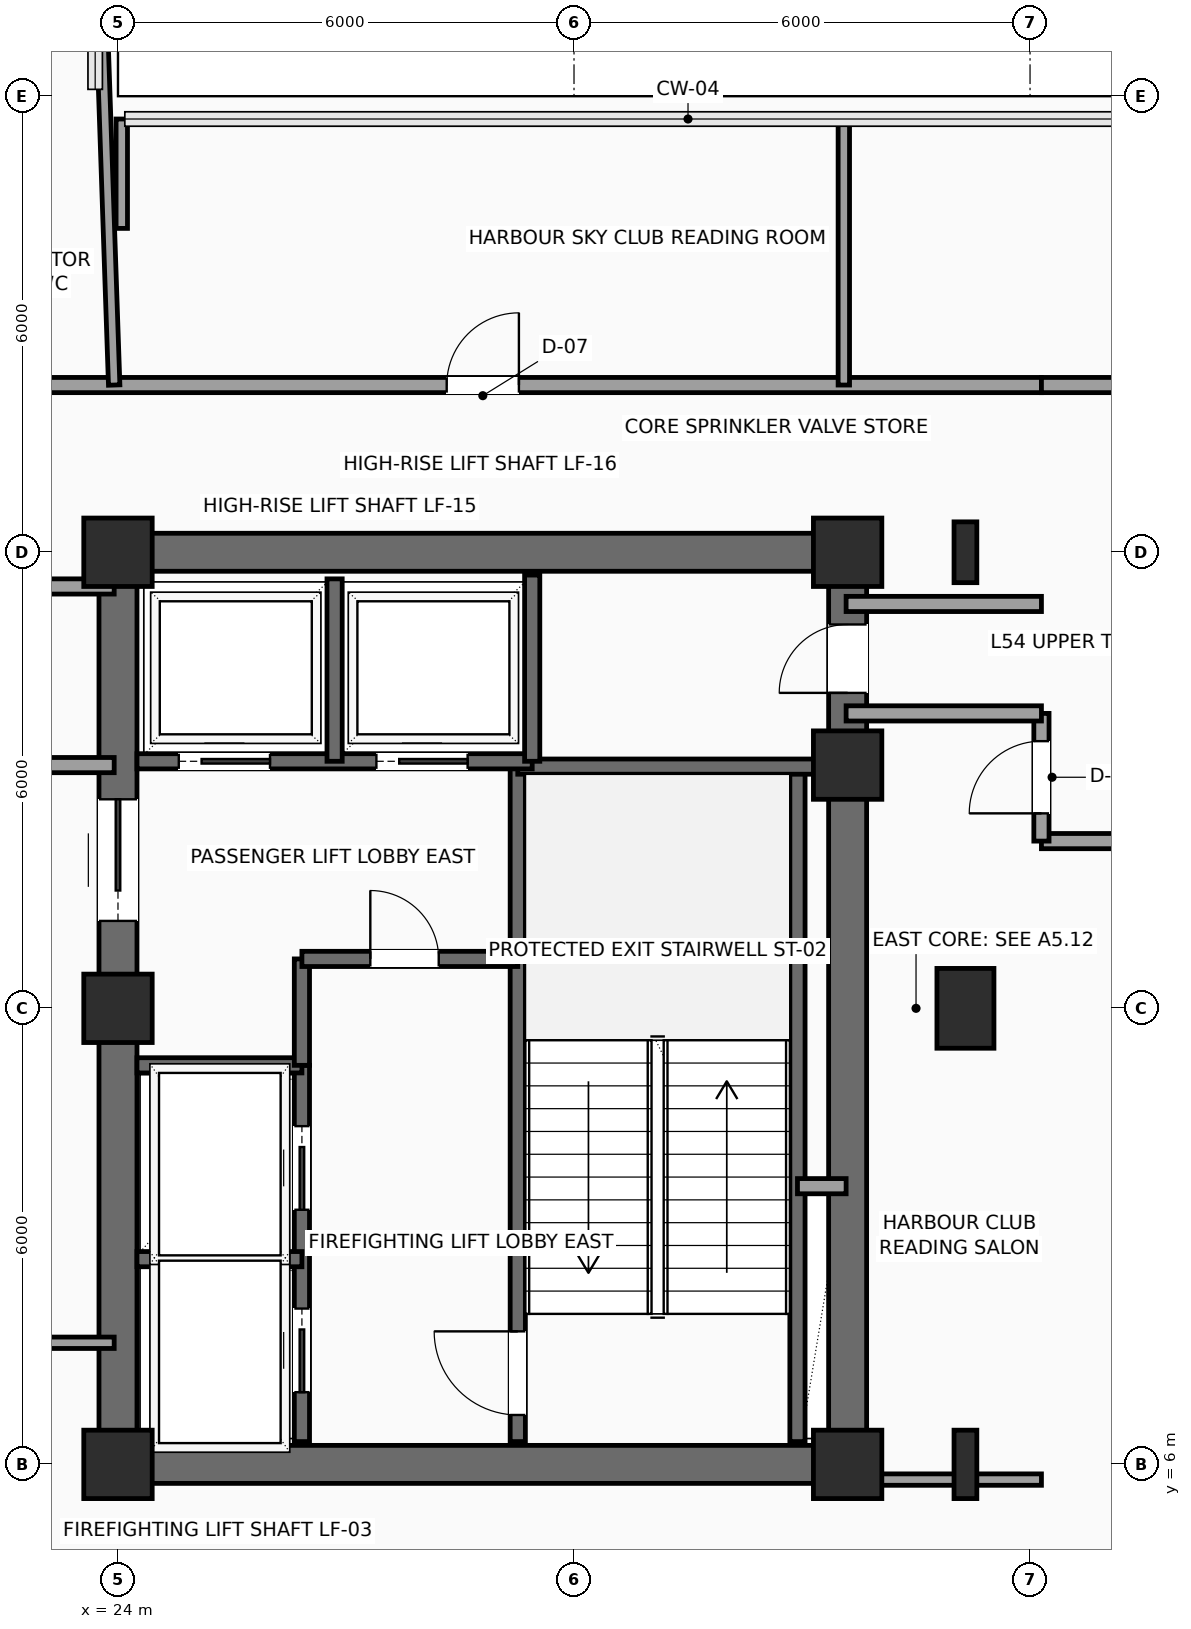
"""IFC4 building model, lengths in metres.
Left out: names, types, materials, properties, quantities, classifications, styles, units other than length and angle.
Written with IfcOpenShell. Run it as: python <this file> out.ifc"""

import sys

from ifc_helpers import new_model, si_unit, direction, frame, frame_2d, origin, origin_2d, place, context, subcontext, project, spatial, rectangle, i_section, extrude, element, fill, save


model = new_model("IFC4")
c1 = context("Model", 3, precision=1e-05, world=origin(), true_north=direction((0.0, 1.0)))
c2 = subcontext(c1, "Body", "Model", "MODEL_VIEW")
j1 = project(units=[si_unit("LENGTHUNIT", "METRE"), si_unit("PLANEANGLEUNIT", "RADIAN")], contexts=[c1])
p1 = place(None, origin())
s1 = spatial("IfcSite", under=j1, at=p1, CompositionType="ELEMENT")
p2 = place(p1, origin())
s2 = spatial("IfcBuilding", under=s1, at=p2, CompositionType="ELEMENT")
p3 = place(p2, frame((0.0, 0.0, 219.9)))
s3 = spatial("IfcBuildingStorey", under=s2, at=p3, CompositionType="ELEMENT", Elevation=219.9)
for number, where, z_axis, x_axis in (
    (1, (24.0, 6.0, 0.0), (0.0, 0.0, 1.0), (1.0, 0.0, 0.0)),
    (2, (24.0, 12.0, 0.0), (0.0, 0.0, 1.0), (1.0, 0.0, 0.0)),
    (3, (24.0, 18.0, 0.0), (0.0, 0.0, 1.0), (1.0, 0.0, 0.0)),
    (4, (33.6, 6.0, 0.0), (0.0, 0.0, 1.0), (1.0, 0.0, 0.0)),
    (5, (33.6, 15.2, 0.0), (0.0, 0.0, 1.0), (1.0, 0.0, 0.0)),
    (6, (33.6, 18.0, 0.0), (0.0, 0.0, 1.0), (1.0, 0.0, 0.0)),
):
    element("IfcColumn", number, at=place(p3, frame(where, z_axis=z_axis, x_axis=x_axis)), inside=s3, PredefinedType="COLUMN", context=c2, shape_type="SweptSolid", body=[
        extrude(rectangle(XDim=0.9, YDim=0.9, at=origin_2d()), origin(), (0.0, 0.0, 1.0), 3.75),
    ])
p4 = place(p3, frame((35.15, 6.0, 0.0), z_axis=(0.0, 0.0, 1.0), x_axis=(1.0, 0.0, 0.0)))
e7 = element("IfcColumn", 7, at=p4, inside=s3, PredefinedType="COLUMN", context=c2, shape_type="SweptSolid", body=[
    extrude(i_section(OverallWidth=0.3, OverallDepth=0.9, WebThickness=0.019, FlangeThickness=0.035, FilletRadius=0.03, at=origin_2d()), origin(), (0.0, 0.0, 1.0), 3.75),
])
p5 = place(p3, frame((35.15, 12.0, 0.0), z_axis=(0.0, 0.0, 1.0), x_axis=(1.0, 0.0, 0.0)))
e8 = element("IfcColumn", 8, at=p5, inside=s3, PredefinedType="COLUMN", context=c2, shape_type="SweptSolid", body=[
    extrude(rectangle(XDim=0.75, YDim=1.05, at=origin_2d()), origin(), (0.0, 0.0, 1.0), 3.75),
])
p6 = place(p3, frame((35.15, 18.0, 0.0), z_axis=(0.0, 0.0, 1.0), x_axis=(1.0, 0.0, 0.0)))
e9 = element("IfcColumn", 9, at=p6, inside=s3, PredefinedType="COLUMN", context=c2, shape_type="SweptSolid", body=[
    extrude(i_section(OverallWidth=0.3, OverallDepth=0.8, WebThickness=0.018, FlangeThickness=0.033, FilletRadius=0.03, at=origin_2d()), origin(), (0.0, 0.0, 1.0), 3.75),
])
for number, where, z_axis, x_axis in (
    (10, (24.0, 6.0, 0.0), (0.0, 0.0, 1.0), (1.0, 0.0, 0.0)),
    (11, (24.0, 18.0, 0.0), (0.0, 0.0, 1.0), (1.0, 0.0, 0.0)),
):
    element("IfcWall", number, at=place(p3, frame(where, z_axis=z_axis, x_axis=x_axis)), inside=s3, PredefinedType="SHEAR", context=c2, shape_type="SweptSolid", body=[
        extrude(rectangle(XDim=9.6, YDim=0.5, at=frame_2d((4.8, 0.0))), origin(), (0.0, 0.0, 1.0), 3.54),
    ])
p7 = place(p3, frame((24.0, 6.0, 0.0), z_axis=(0.0, 0.0, 1.0), x_axis=(0.0, 1.0, 0.0)))
e12 = element("IfcWall", 12, at=p7, inside=s3, PredefinedType="SHEAR", context=c2, shape_type="SweptSolid", body=[
    extrude(rectangle(XDim=12.0, YDim=0.5, at=frame_2d((6.0, 0.0))), origin(), (0.0, 0.0, 1.0), 3.54),
])
p8 = place(p7, frame((7.15, 0.0, 0.0)))
e13 = element("IfcOpeningElement", 13, at=p8, cuts=e12, PredefinedType="OPENING", context=c2, shape_type="SweptSolid", body=[
    extrude(rectangle(XDim=1.6, YDim=2.3, at=frame_2d((0.8, 1.15))), frame((0.0, 0.26, 0.0), z_axis=(0.0, -1.0, 0.0), x_axis=(1.0, 0.0, 0.0)), (0.0, 0.0, 1.0), 0.52),
])
p9 = place(p3, frame((33.6, 6.0, 0.0), z_axis=(0.0, 0.0, 1.0), x_axis=(0.0, 1.0, 0.0)))
e14 = element("IfcWall", 14, at=p9, inside=s3, PredefinedType="SHEAR", context=c2, shape_type="SweptSolid", body=[
    extrude(rectangle(XDim=12.0, YDim=0.5, at=frame_2d((6.0, 0.0))), origin(), (0.0, 0.0, 1.0), 3.54),
])
p10 = place(p9, frame((10.15, 0.0, 0.0)))
e15 = element("IfcOpeningElement", 15, at=p10, cuts=e14, PredefinedType="OPENING", context=c2, shape_type="SweptSolid", body=[
    extrude(rectangle(XDim=0.9, YDim=2.15, at=frame_2d((0.45, 1.075))), frame((0.0, 0.26, 0.0), z_axis=(0.0, -1.0, 0.0), x_axis=(1.0, 0.0, 0.0)), (0.0, 0.0, 1.0), 0.52),
])
p11 = place(p3, frame((29.26, 6.3, 0.0), z_axis=(0.0, 0.0, 1.0), x_axis=(0.0, 1.0, 0.0)))
e16 = element("IfcWall", 16, at=p11, inside=s3, PredefinedType="SHEAR", context=c2, shape_type="SweptSolid", body=[
    extrude(rectangle(XDim=8.88, YDim=0.2, at=frame_2d((4.44, 0.0))), origin(), (0.0, 0.0, 1.0), 3.54),
])
p12 = place(p11, frame((0.35, 0.0, 0.0)))
e17 = element("IfcOpeningElement", 17, at=p12, cuts=e16, PredefinedType="OPENING", context=c2, shape_type="SweptSolid", body=[
    extrude(rectangle(XDim=1.1, YDim=2.2, at=frame_2d((0.55, 1.1))), frame((0.0, 0.11, 0.0), z_axis=(0.0, -1.0, 0.0), x_axis=(1.0, 0.0, 0.0)), (0.0, 0.0, 1.0), 0.22),
])
p13 = place(p3, frame((32.94, 6.3, 0.0), z_axis=(0.0, 0.0, 1.0), x_axis=(0.0, 1.0, 0.0)))
e18 = element("IfcWall", 18, at=p13, inside=s3, PredefinedType="SHEAR", context=c2, shape_type="SweptSolid", body=[
    extrude(rectangle(XDim=8.88, YDim=0.2, at=frame_2d((4.44, 0.0))), origin(), (0.0, 0.0, 1.0), 3.54),
])
p14 = place(p3, frame((29.26, 15.18, 0.0), z_axis=(0.0, 0.0, 1.0), x_axis=(1.0, 0.0, 0.0)))
e19 = element("IfcWall", 19, at=p14, inside=s3, PredefinedType="SHEAR", context=c2, shape_type="SweptSolid", body=[
    extrude(rectangle(XDim=4.04, YDim=0.2, at=frame_2d((2.02, 0.0))), origin(), (0.0, 0.0, 1.0), 3.54),
])
p15 = place(p3, frame((26.42, 6.3, 0.0), z_axis=(0.0, 0.0, 1.0), x_axis=(0.0, 1.0, 0.0)))
e20 = element("IfcWall", 20, at=p15, inside=s3, PredefinedType="SHEAR", context=c2, shape_type="SweptSolid", body=[
    extrude(rectangle(XDim=4.95, YDim=0.2, at=frame_2d((2.475, 0.0))), origin(), (0.0, 0.0, 1.0), 3.54),
])
p16 = place(p15, frame((0.65, 0.0, 0.0)))
e21 = element("IfcOpeningElement", 21, at=p16, cuts=e20, PredefinedType="OPENING", context=c2, shape_type="SweptSolid", body=[
    extrude(rectangle(XDim=1.1, YDim=2.2, at=frame_2d((0.55, 1.1))), frame((0.0, 0.11, 0.0), z_axis=(0.0, -1.0, 0.0), x_axis=(1.0, 0.0, 0.0)), (0.0, 0.0, 1.0), 0.22),
])
p17 = place(p15, frame((3.05, 0.0, 0.0)))
e22 = element("IfcOpeningElement", 22, at=p17, cuts=e20, PredefinedType="OPENING", context=c2, shape_type="SweptSolid", body=[
    extrude(rectangle(XDim=1.1, YDim=2.2, at=frame_2d((0.55, 1.1))), frame((0.0, 0.11, 0.0), z_axis=(0.0, -1.0, 0.0), x_axis=(1.0, 0.0, 0.0)), (0.0, 0.0, 1.0), 0.22),
])
for number, where, z_axis, x_axis in (
    (23, (24.25, 8.7, 0.0), (0.0, 0.0, 1.0), (1.0, 0.0, 0.0)),
    (24, (24.25, 11.25, 0.0), (0.0, 0.0, 1.0), (1.0, 0.0, 0.0)),
):
    element("IfcWall", number, at=place(p3, frame(where, z_axis=z_axis, x_axis=x_axis)), inside=s3, PredefinedType="SHEAR", context=c2, shape_type="SweptSolid", body=[
        extrude(rectangle(XDim=2.17, YDim=0.2, at=frame_2d((1.085, 0.0))), origin(), (0.0, 0.0, 1.0), 3.54),
    ])
p18 = place(p3, frame((26.42, 11.25, 0.0), z_axis=(0.0, 0.0, 1.0), x_axis=(0.0, 1.0, 0.0)))
e25 = element("IfcWall", 25, at=p18, inside=s3, PredefinedType="SHEAR", context=c2, shape_type="SweptSolid", body=[
    extrude(rectangle(XDim=1.4, YDim=0.2, at=frame_2d((0.7, 0.0))), origin(), (0.0, 0.0, 1.0), 3.54),
])
p19 = place(p3, frame((26.42, 12.65, 0.0), z_axis=(0.0, 0.0, 1.0), x_axis=(1.0, 0.0, 0.0)))
e26 = element("IfcWall", 26, at=p19, inside=s3, PredefinedType="SHEAR", context=c2, shape_type="SweptSolid", body=[
    extrude(rectangle(XDim=2.84, YDim=0.2, at=frame_2d((1.42, 0.0))), origin(), (0.0, 0.0, 1.0), 3.54),
])
p20 = place(p19, frame((0.9, 0.0, 0.0)))
e27 = element("IfcOpeningElement", 27, at=p20, cuts=e26, PredefinedType="OPENING", context=c2, shape_type="SweptSolid", body=[
    extrude(rectangle(XDim=0.9, YDim=2.15, at=frame_2d((0.45, 1.075))), frame((0.0, 0.11, 0.0), z_axis=(0.0, -1.0, 0.0), x_axis=(1.0, 0.0, 0.0)), (0.0, 0.0, 1.0), 0.22),
])
p21 = place(p3, frame((32.94, 9.66, 0.0), z_axis=(0.0, 0.0, 1.0), x_axis=(1.0, 0.0, 0.0)))
e28 = element("IfcWall", 28, at=p21, inside=s3, PredefinedType="SOLIDWALL", context=c2, shape_type="SweptSolid", body=[
    extrude(rectangle(XDim=0.64, YDim=0.2, at=frame_2d((0.32, 0.0))), origin(), (0.0, 0.0, 1.0), 3.54),
])
p22 = place(p3, frame((24.25, 15.25, 0.0), z_axis=(0.0, 0.0, 1.0), x_axis=(1.0, 0.0, 0.0)))
e29 = element("IfcWall", 29, at=p22, inside=s3, PredefinedType="SHEAR", context=c2, shape_type="SweptSolid", body=[
    extrude(rectangle(XDim=5.2, YDim=0.2, at=frame_2d((2.6, 0.0))), origin(), (0.0, 0.0, 1.0), 3.54),
])
p23 = place(p22, frame((0.55, 0.0, 0.0)))
e30 = element("IfcOpeningElement", 30, at=p23, cuts=e29, PredefinedType="OPENING", context=c2, shape_type="SweptSolid", body=[
    extrude(rectangle(XDim=1.2, YDim=2.2, at=frame_2d((0.6, 1.1))), frame((0.0, 0.11, 0.0), z_axis=(0.0, -1.0, 0.0), x_axis=(1.0, 0.0, 0.0)), (0.0, 0.0, 1.0), 0.22),
])
p24 = place(p22, frame((3.15, 0.0, 0.0)))
e31 = element("IfcOpeningElement", 31, at=p24, cuts=e29, PredefinedType="OPENING", context=c2, shape_type="SweptSolid", body=[
    extrude(rectangle(XDim=1.2, YDim=2.2, at=frame_2d((0.6, 1.1))), frame((0.0, 0.11, 0.0), z_axis=(0.0, -1.0, 0.0), x_axis=(1.0, 0.0, 0.0)), (0.0, 0.0, 1.0), 0.22),
])
p25 = place(p3, frame((26.85, 15.25, 0.0), z_axis=(0.0, 0.0, 1.0), x_axis=(0.0, 1.0, 0.0)))
e32 = element("IfcWall", 32, at=p25, inside=s3, PredefinedType="SHEAR", context=c2, shape_type="SweptSolid", body=[
    extrude(rectangle(XDim=2.4, YDim=0.2, at=frame_2d((1.2, 0.0))), origin(), (0.0, 0.0, 1.0), 3.54),
])
p26 = place(p3, frame((29.45, 15.25, 0.0), z_axis=(0.0, 0.0, 1.0), x_axis=(0.0, 1.0, 0.0)))
e33 = element("IfcWall", 33, at=p26, inside=s3, PredefinedType="SHEAR", context=c2, shape_type="SweptSolid", body=[
    extrude(rectangle(XDim=2.45, YDim=0.2, at=frame_2d((1.225, 0.0))), origin(), (0.0, 0.0, 1.0), 3.54),
])
p27 = place(p3, frame((20.45, 20.2, 0.0), z_axis=(0.0, 0.0, 1.0), x_axis=(1.0, 0.0, 0.0)))
e34 = element("IfcWall", 34, at=p27, inside=s3, PredefinedType="SOLIDWALL", context=c2, shape_type="SweptSolid", body=[
    extrude(rectangle(XDim=15.7, YDim=0.2, at=frame_2d((7.85, 0.0))), origin(), (0.0, 0.0, 1.0), 3.54),
])
p28 = place(p27, frame((7.875, 0.0, 0.0)))
e35 = element("IfcOpeningElement", 35, at=p28, cuts=e34, PredefinedType="OPENING", context=c2, shape_type="SweptSolid", body=[
    extrude(rectangle(XDim=0.95, YDim=2.15, at=frame_2d((0.475, 1.075))), frame((0.0, 0.11, 0.0), z_axis=(0.0, -1.0, 0.0), x_axis=(1.0, 0.0, 0.0)), (0.0, 0.0, 1.0), 0.22),
])
for number, where, z_axis, x_axis in (
    (36, (36.15, 20.2, 0.0), (0.0, 0.0, 1.0), (1.0, 0.0, 0.0)),
    (37, (38.55, 14.2, 0.0), (0.0, 0.0, 1.0), (-1.0, 0.0, 0.0)),
):
    element("IfcWall", number, at=place(p3, frame(where, z_axis=z_axis, x_axis=x_axis)), inside=s3, PredefinedType="SOLIDWALL", context=c2, shape_type="SweptSolid", body=[
        extrude(rectangle(XDim=2.4, YDim=0.2, at=frame_2d((1.2, 0.0))), origin(), (0.0, 0.0, 1.0), 3.54),
    ])
p29 = place(p3, frame((36.15, 14.2, 0.0), z_axis=(0.0, 0.0, 1.0), x_axis=(0.0, 1.0, 0.0)))
e38 = element("IfcWall", 38, at=p29, inside=s3, PredefinedType="SOLIDWALL", context=c2, shape_type="SweptSolid", body=[
    extrude(rectangle(XDim=1.68, YDim=0.2, at=frame_2d((0.84, 0.0))), origin(), (0.0, 0.0, 1.0), 3.54),
])
p30 = place(p29, frame((0.365, 0.0, 0.0)))
e39 = element("IfcOpeningElement", 39, at=p30, cuts=e38, PredefinedType="OPENING", context=c2, shape_type="SweptSolid", body=[
    extrude(rectangle(XDim=0.95, YDim=2.15, at=frame_2d((0.475, 1.075))), frame((0.0, 0.11, 0.0), z_axis=(0.0, -1.0, 0.0), x_axis=(1.0, 0.0, 0.0)), (0.0, 0.0, 1.0), 0.22),
])
for number, where, z_axis, x_axis in (
    (40, (36.15, 15.88, 0.0), (0.0, 0.0, 1.0), (-1.0, 0.0, 0.0)),
    (41, (33.58, 17.32, 0.0), (0.0, 0.0, 1.0), (1.0, 0.0, 0.0)),
):
    element("IfcWall", number, at=place(p3, frame(where, z_axis=z_axis, x_axis=x_axis)), inside=s3, PredefinedType="SOLIDWALL", context=c2, shape_type="SweptSolid", body=[
        extrude(rectangle(XDim=2.57, YDim=0.2, at=frame_2d((1.285, 0.0))), origin(), (0.0, 0.0, 1.0), 3.54),
    ])
p31 = place(p3, frame((20.45, 17.55, 0.0), z_axis=(0.0, 0.0, 1.0), x_axis=(1.0, 0.0, 0.0)))
e42 = element("IfcWall", 42, at=p31, inside=s3, PredefinedType="SOLIDWALL", context=c2, shape_type="SweptSolid", body=[
    extrude(rectangle(XDim=3.5, YDim=0.2, at=frame_2d((1.75, 0.0))), origin(), (0.0, 0.0, 1.0), 3.54),
])
p32 = place(p3, frame((23.95, 15.2, 0.0), z_axis=(0.0, 0.0, 1.0), x_axis=(-1.0, 0.0, 0.0)))
e43 = element("IfcWall", 43, at=p32, inside=s3, PredefinedType="SOLIDWALL", context=c2, shape_type="SweptSolid", body=[
    extrude(rectangle(XDim=9.0, YDim=0.2, at=frame_2d((4.5, 0.0))), origin(), (0.0, 0.0, 1.0), 3.132),
])
p33 = place(p3, frame((23.95, 20.2, 0.0), z_axis=(0.0, 0.0, 1.0), x_axis=(-0.033993495762, 0.999422054112, 0.0)))
e44 = element("IfcWall", 44, at=p33, inside=s3, PredefinedType="PARTITIONING", context=c2, shape_type="SweptSolid", body=[
    extrude(rectangle(XDim=7.354, YDim=0.15, at=frame_2d((3.677, 0.0))), origin(), (0.0, 0.0, 1.0), 3.54),
])
p34 = place(p3, frame((24.05, 22.261, 0.0), z_axis=(0.0, 0.0, 1.0), x_axis=(0.0, 1.0, 0.0)))
e45 = element("IfcWall", 45, at=p34, inside=s3, PredefinedType="PARTITIONING", context=c2, shape_type="SweptSolid", body=[
    extrude(rectangle(XDim=1.439, YDim=0.15, at=frame_2d((0.719, 0.0))), origin(), (0.0, 0.0, 1.0), 3.54),
])
p35 = place(p3, frame((33.55, 20.2, 0.0), z_axis=(0.0, 0.0, 1.0), x_axis=(0.0, 1.0, 0.0)))
e46 = element("IfcWall", 46, at=p35, inside=s3, PredefinedType="PARTITIONING", context=c2, shape_type="SweptSolid", body=[
    extrude(rectangle(XDim=3.5, YDim=0.15, at=frame_2d((1.75, 0.0))), origin(), (0.0, 0.0, 1.0), 3.54),
])
p36 = place(p3, frame((33.65, 5.8, 0.0), z_axis=(0.0, 0.0, 1.0), x_axis=(1.0, 0.0, 0.0)))
e47 = element("IfcWall", 47, at=p36, inside=s3, PredefinedType="PARTITIONING", context=c2, shape_type="SweptSolid", body=[
    extrude(rectangle(XDim=2.5, YDim=0.15, at=frame_2d((1.25, 0.0))), origin(), (0.0, 0.0, 1.0), 3.132),
])
p37 = place(p3, frame((14.95, 7.6, 0.0), z_axis=(0.0, 0.0, 1.0), x_axis=(1.0, 0.0, 0.0)))
e48 = element("IfcWall", 48, at=p37, inside=s3, PredefinedType="PARTITIONING", context=c2, shape_type="SweptSolid", body=[
    extrude(rectangle(XDim=9.0, YDim=0.15, at=frame_2d((4.5, 0.0))), origin(), (0.0, 0.0, 1.0), 3.54),
])
p38 = place(p8, origin())
e49 = element("IfcDoor", 49, at=p38, inside=s3, OperationType="DOUBLE_DOOR_SLIDING", PredefinedType="DOOR", context=c2, shape_type="SweptSolid", body=[
    extrude(rectangle(XDim=1.6, YDim=2.3, at=frame_2d((0.8, 1.15))), frame((0.0, 0.025, 0.0), z_axis=(0.0, -1.0, 0.0), x_axis=(1.0, 0.0, 0.0)), (0.0, 0.0, 1.0), 0.05),
])
fill(e13, e49)
p39 = place(p10, origin())
e50 = element("IfcDoor", 50, at=p39, inside=s3, OperationType="SINGLE_SWING_LEFT", PredefinedType="DOOR", context=c2, shape_type="SweptSolid", body=[
    extrude(rectangle(XDim=0.9, YDim=2.15, at=frame_2d((0.45, 1.075))), frame((0.0, 0.025, 0.0), z_axis=(0.0, -1.0, 0.0), x_axis=(1.0, 0.0, 0.0)), (0.0, 0.0, 1.0), 0.05),
])
fill(e15, e50)
p40 = place(p12, origin())
e51 = element("IfcDoor", 51, at=p40, inside=s3, OperationType="SINGLE_SWING_RIGHT", PredefinedType="DOOR", context=c2, shape_type="SweptSolid", body=[
    extrude(rectangle(XDim=1.1, YDim=2.2, at=frame_2d((0.55, 1.1))), frame((0.0, 0.025, 0.0), z_axis=(0.0, -1.0, 0.0), x_axis=(1.0, 0.0, 0.0)), (0.0, 0.0, 1.0), 0.05),
])
fill(e17, e51)
p41 = place(p16, origin())
e52 = element("IfcDoor", 52, at=p41, inside=s3, OperationType="SLIDING_TO_LEFT", PredefinedType="DOOR", context=c2, shape_type="SweptSolid", body=[
    extrude(rectangle(XDim=1.1, YDim=2.2, at=frame_2d((0.55, 1.1))), frame((0.0, 0.025, 0.0), z_axis=(0.0, -1.0, 0.0), x_axis=(1.0, 0.0, 0.0)), (0.0, 0.0, 1.0), 0.05),
])
fill(e21, e52)
p42 = place(p17, origin())
e53 = element("IfcDoor", 53, at=p42, inside=s3, OperationType="SLIDING_TO_LEFT", PredefinedType="DOOR", context=c2, shape_type="SweptSolid", body=[
    extrude(rectangle(XDim=1.1, YDim=2.2, at=frame_2d((0.55, 1.1))), frame((0.0, 0.025, 0.0), z_axis=(0.0, -1.0, 0.0), x_axis=(1.0, 0.0, 0.0)), (0.0, 0.0, 1.0), 0.05),
])
fill(e22, e53)
p43 = place(p20, origin())
e54 = element("IfcDoor", 54, at=p43, inside=s3, OperationType="SINGLE_SWING_LEFT", PredefinedType="DOOR", context=c2, shape_type="SweptSolid", body=[
    extrude(rectangle(XDim=0.9, YDim=2.15, at=frame_2d((0.45, 1.075))), frame((0.0, 0.025, 0.0), z_axis=(0.0, -1.0, 0.0), x_axis=(1.0, 0.0, 0.0)), (0.0, 0.0, 1.0), 0.05),
])
fill(e27, e54)
p44 = place(p23, origin())
e55 = element("IfcDoor", 55, at=p44, inside=s3, OperationType="SLIDING_TO_RIGHT", PredefinedType="DOOR", context=c2, shape_type="SweptSolid", body=[
    extrude(rectangle(XDim=1.2, YDim=2.2, at=frame_2d((0.6, 1.1))), frame((0.0, 0.025, 0.0), z_axis=(0.0, -1.0, 0.0), x_axis=(1.0, 0.0, 0.0)), (0.0, 0.0, 1.0), 0.05),
])
fill(e30, e55)
p45 = place(p24, origin())
e56 = element("IfcDoor", 56, at=p45, inside=s3, OperationType="SLIDING_TO_RIGHT", PredefinedType="DOOR", context=c2, shape_type="SweptSolid", body=[
    extrude(rectangle(XDim=1.2, YDim=2.2, at=frame_2d((0.6, 1.1))), frame((0.0, 0.025, 0.0), z_axis=(0.0, -1.0, 0.0), x_axis=(1.0, 0.0, 0.0)), (0.0, 0.0, 1.0), 0.05),
])
fill(e31, e56)
p46 = place(p28, origin())
e57 = element("IfcDoor", 57, at=p46, inside=s3, OperationType="SINGLE_SWING_RIGHT", PredefinedType="DOOR", context=c2, shape_type="SweptSolid", body=[
    extrude(rectangle(XDim=0.95, YDim=2.15, at=frame_2d((0.475, 1.075))), frame((0.0, 0.025, 0.0), z_axis=(0.0, -1.0, 0.0), x_axis=(1.0, 0.0, 0.0)), (0.0, 0.0, 1.0), 0.05),
])
fill(e35, e57)
p47 = place(p30, origin())
e58 = element("IfcDoor", 58, at=p47, inside=s3, OperationType="SINGLE_SWING_LEFT", PredefinedType="DOOR", context=c2, shape_type="SweptSolid", body=[
    extrude(rectangle(XDim=0.95, YDim=2.15, at=frame_2d((0.475, 1.075))), frame((0.0, 0.025, 0.0), z_axis=(0.0, -1.0, 0.0), x_axis=(1.0, 0.0, 0.0)), (0.0, 0.0, 1.0), 0.05),
])
fill(e39, e58)
save(model, sys.argv[1])
